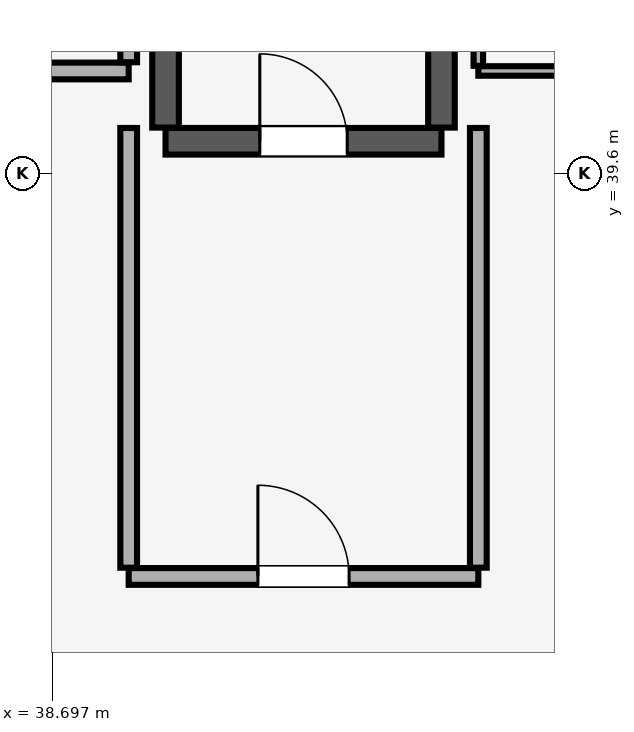
"""IFC4 building model, lengths in metres.
Left out: names, types, materials, properties, quantities, classifications, styles, units other than length and angle.
Written with IfcOpenShell. Run it as: python <this file> out.ifc"""

import sys

from ifc_helpers import new_model, si_unit, direction, frame, frame_2d, origin, place, context, subcontext, project, spatial, rectangle, extrude, element, fill, save


model = new_model("IFC4")
c1 = context("Model", 3, precision=1e-05, world=origin(), true_north=direction((0.0, 1.0)))
c2 = subcontext(c1, "Body", "Model", "MODEL_VIEW")
j1 = project(units=[si_unit("LENGTHUNIT", "METRE"), si_unit("PLANEANGLEUNIT", "RADIAN")], contexts=[c1])
p1 = place(None, origin())
s1 = spatial("IfcSite", under=j1, at=p1, CompositionType="ELEMENT")
p2 = place(p1, origin())
s2 = spatial("IfcBuilding", under=s1, at=p2, CompositionType="ELEMENT")
p3 = place(p2, frame((0.0, 0.0, 68.9)))
s3 = spatial("IfcBuildingStorey", under=s2, at=p3, CompositionType="ELEMENT", Elevation=68.9)
p4 = place(p3, frame((40.185, 40.025, 0.0), z_axis=(0.0, 0.0, 1.0), x_axis=(1.0, 0.0, 0.0)))
e1 = element("IfcWall", 1, at=p4, inside=s3, PredefinedType="SHEAR", context=c2, shape_type="SweptSolid", body=[
    extrude(rectangle(XDim=3.63, YDim=0.35, at=frame_2d((1.815, 0.0))), origin(), (0.0, 0.0, 1.0), 3.51),
])
p5 = place(p4, frame((1.24, 0.0, 0.0)))
e2 = element("IfcOpeningElement", 2, at=p5, cuts=e1, PredefinedType="OPENING", context=c2, shape_type="SweptSolid", body=[
    extrude(rectangle(XDim=1.15, YDim=2.15, at=frame_2d((0.575, 1.075))), frame((0.0, 0.185, 0.0), z_axis=(0.0, -1.0, 0.0), x_axis=(1.0, 0.0, 0.0)), (0.0, 0.0, 1.0), 0.37),
])
for number, where, z_axis, x_axis in (
    (3, (40.185, 40.205, 0.0), (0.0, 0.0, 1.0), (0.0, 1.0, 0.0)),
    (4, (43.815, 40.205, 0.0), (0.0, 0.0, 1.0), (0.0, 1.0, 0.0)),
):
    element("IfcWall", number, at=place(p3, frame(where, z_axis=z_axis, x_axis=x_axis)), inside=s3, PredefinedType="SHEAR", context=c2, shape_type="SweptSolid", body=[
        extrude(rectangle(XDim=8.09, YDim=0.35, at=frame_2d((4.045, 0.0))), origin(), (0.0, 0.0, 1.0), 3.51),
    ])
p6 = place(p3, frame((39.7, 34.3, 0.0), z_axis=(0.0, 0.0, 1.0), x_axis=(1.0, 0.0, 0.0)))
e5 = element("IfcWall", 5, at=p6, inside=s3, PredefinedType="PARTITIONING", context=c2, shape_type="SweptSolid", body=[
    extrude(rectangle(XDim=4.6, YDim=0.22, at=frame_2d((2.3, 0.0))), origin(), (0.0, 0.0, 1.0), 3.51),
])
p7 = place(p6, frame((1.7, 0.0, 0.0)))
e6 = element("IfcOpeningElement", 6, at=p7, cuts=e5, PredefinedType="OPENING", context=c2, shape_type="SweptSolid", body=[
    extrude(rectangle(XDim=1.2, YDim=2.15, at=frame_2d((0.6, 1.075))), frame((0.0, 0.12, 0.0), z_axis=(0.0, -1.0, 0.0), x_axis=(1.0, 0.0, 0.0)), (0.0, 0.0, 1.0), 0.24),
])
for number, where, z_axis, x_axis in (
    (7, (39.7, 34.415, 0.0), (0.0, 0.0, 1.0), (0.0, 1.0, 0.0)),
    (8, (44.3, 34.415, 0.0), (0.0, 0.0, 1.0), (0.0, 1.0, 0.0)),
):
    element("IfcWall", number, at=place(p3, frame(where, z_axis=z_axis, x_axis=x_axis)), inside=s3, PredefinedType="PARTITIONING", context=c2, shape_type="SweptSolid", body=[
        extrude(rectangle(XDim=5.785, YDim=0.22, at=frame_2d((2.893, 0.0))), origin(), (0.0, 0.0, 1.0), 3.51),
    ])
p8 = place(p3, frame((35.18, 40.95, 0.0), z_axis=(0.0, 0.0, 1.0), x_axis=(1.0, 0.0, 0.0)))
e9 = element("IfcWall", 9, at=p8, inside=s3, PredefinedType="PARTITIONING", context=c2, shape_type="SweptSolid", body=[
    extrude(rectangle(XDim=4.52, YDim=0.22, at=frame_2d((2.26, 0.0))), origin(), (0.0, 0.0, 1.0), 3.51),
])
p9 = place(p8, frame((0.795, 0.0, 0.0)))
e10 = element("IfcOpeningElement", 10, at=p9, cuts=e9, PredefinedType="OPENING", context=c2, shape_type="SweptSolid", body=[
    extrude(rectangle(XDim=0.85, YDim=2.1, at=frame_2d((0.425, 1.05))), frame((0.0, 0.12, 0.0), z_axis=(0.0, -1.0, 0.0), x_axis=(1.0, 0.0, 0.0)), (0.0, 0.0, 1.0), 0.24),
])
p10 = place(p3, frame((39.7, 41.065, 0.0), z_axis=(0.0, 0.0, 1.0), x_axis=(0.0, 1.0, 0.0)))
e11 = element("IfcWall", 11, at=p10, inside=s3, PredefinedType="PARTITIONING", context=c2, shape_type="SweptSolid", body=[
    extrude(rectangle(XDim=7.785, YDim=0.22, at=frame_2d((3.893, 0.0))), origin(), (0.0, 0.0, 1.0), 3.51),
])
p11 = place(p3, frame((44.3, 40.95, 0.0), z_axis=(0.0, 0.0, 1.0), x_axis=(1.0, 0.0, 0.0)))
e12 = element("IfcWall", 12, at=p11, inside=s3, PredefinedType="PARTITIONING", context=c2, shape_type="SweptSolid", body=[
    extrude(rectangle(XDim=3.1, YDim=0.125, at=frame_2d((1.55, 0.0))), origin(), (0.0, 0.0, 1.0), 3.51),
])
p12 = place(p11, frame((1.1, 0.0, 0.0)))
e13 = element("IfcOpeningElement", 13, at=p12, cuts=e12, PredefinedType="OPENING", context=c2, shape_type="SweptSolid", body=[
    extrude(rectangle(XDim=0.9, YDim=2.1, at=frame_2d((0.45, 1.05))), frame((0.0, 0.073, 0.0), z_axis=(0.0, -1.0, 0.0), x_axis=(1.0, 0.0, 0.0)), (0.0, 0.0, 1.0), 0.145),
])
p13 = place(p3, frame((44.3, 41.018, 0.0), z_axis=(0.0, 0.0, 1.0), x_axis=(0.0, 1.0, 0.0)))
e14 = element("IfcWall", 14, at=p13, inside=s3, PredefinedType="PARTITIONING", context=c2, shape_type="SweptSolid", body=[
    extrude(rectangle(XDim=7.833, YDim=0.125, at=frame_2d((3.916, 0.0))), origin(), (0.0, 0.0, 1.0), 3.51),
])
p14 = place(p5, origin())
e15 = element("IfcDoor", 15, at=p14, inside=s3, OperationType="SINGLE_SWING_LEFT", PredefinedType="DOOR", context=c2, shape_type="SweptSolid", body=[
    extrude(rectangle(XDim=1.15, YDim=2.15, at=frame_2d((0.575, 1.075))), frame((0.0, 0.025, 0.0), z_axis=(0.0, -1.0, 0.0), x_axis=(1.0, 0.0, 0.0)), (0.0, 0.0, 1.0), 0.05),
])
fill(e2, e15)
p15 = place(p7, origin())
e16 = element("IfcDoor", 16, at=p15, inside=s3, OperationType="SINGLE_SWING_LEFT", PredefinedType="DOOR", context=c2, shape_type="SweptSolid", body=[
    extrude(rectangle(XDim=1.2, YDim=2.15, at=frame_2d((0.6, 1.075))), frame((0.0, 0.025, 0.0), z_axis=(0.0, -1.0, 0.0), x_axis=(1.0, 0.0, 0.0)), (0.0, 0.0, 1.0), 0.05),
])
fill(e6, e16)
save(model, sys.argv[1])
